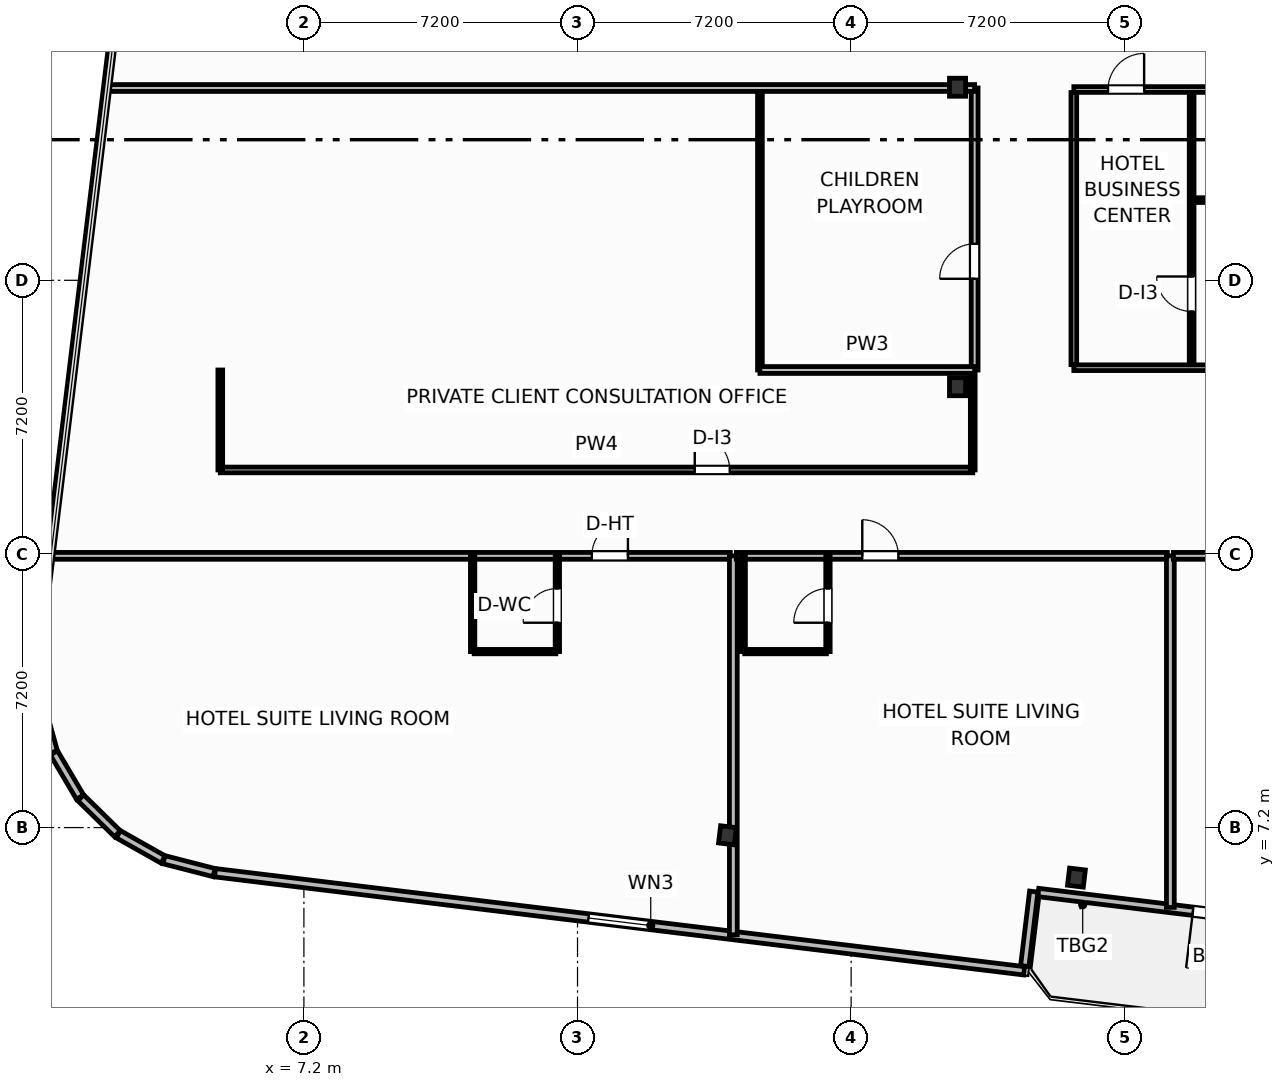
"""IFC4 building model, lengths in metres.
Left out: names, types, materials, properties, quantities, classifications, styles, units other than length and angle.
Written with IfcOpenShell. Run it as: python <this file> out.ifc"""

import sys

from ifc_helpers import new_model, si_unit, direction, frame, frame_2d, origin, origin_2d, place, context, subcontext, project, spatial, rectangle, i_section, extrude, element, fill, save


model = new_model("IFC4")
c1 = context("Model", 3, precision=1e-05, world=origin(), true_north=direction((0.0, 1.0)))
c2 = subcontext(c1, "Body", "Model", "MODEL_VIEW")
j1 = project(units=[si_unit("LENGTHUNIT", "METRE"), si_unit("PLANEANGLEUNIT", "RADIAN")], contexts=[c1])
p1 = place(None, origin())
s1 = spatial("IfcSite", under=j1, at=p1, CompositionType="ELEMENT")
p2 = place(p1, origin())
s2 = spatial("IfcBuilding", under=s1, at=p2, CompositionType="ELEMENT")
p3 = place(p2, frame((0.0, 0.0, 132.8)))
s3 = spatial("IfcBuildingStorey", under=s2, at=p3, CompositionType="ELEMENT", Elevation=132.8)
for number, where, z_axis, x_axis in (
    (1, (24.4, 18.8, 0.0), (0.0, 0.0, 1.0), (1.0, 0.0, 0.0)),
    (2, (24.4, 26.68, 0.0), (0.0, 0.0, 1.0), (1.0, 0.0, 0.0)),
):
    element("IfcColumn", number, at=place(p3, frame(where, z_axis=z_axis, x_axis=x_axis)), inside=s3, PredefinedType="COLUMN", context=c2, shape_type="SweptSolid", body=[
        extrude(i_section(OverallWidth=0.424, OverallDepth=0.474, WebThickness=0.048, FlangeThickness=0.077, FilletRadius=0.025, at=origin_2d()), origin(), (0.0, 0.0, 1.0), 3.7),
    ])
for number, where, z_axis, x_axis in (
    (3, (18.346, 6.997, 0.0), (0.0, 0.0, 1.0), (0.993, -0.12, 0.0)),
    (4, (27.529, 5.884, 0.0), (0.0, 0.0, 1.0), (0.993, -0.12, 0.0)),
):
    element("IfcColumn", number, at=place(p3, frame(where, z_axis=z_axis, x_axis=x_axis)), inside=s3, PredefinedType="COLUMN", context=c2, shape_type="SweptSolid", body=[
        extrude(i_section(OverallWidth=0.418, OverallDepth=0.455, WebThickness=0.042, FlangeThickness=0.068, FilletRadius=0.025, at=origin_2d()), origin(), (0.0, 0.0, 1.0), 3.7),
    ])
p4 = place(p3, frame((32.48, 4.77, 0.0), z_axis=(0.0, 0.0, 1.0), x_axis=(-0.992735402148, 0.120318000826, 0.0)))
e5 = element("IfcWall", 5, at=p4, inside=s3, PredefinedType="SOLIDWALL", context=c2, shape_type="SweptSolid", body=[
    extrude(rectangle(XDim=6.0, YDim=0.22, at=frame_2d((3.0, 0.0))), origin(), (0.0, 0.0, 1.0), 2.73),
])
p5 = place(p4, frame((0.4, 0.0, 0.0)))
e6 = element("IfcOpeningElement", 6, at=p5, cuts=e5, PredefinedType="OPENING", context=c2, shape_type="SweptSolid", body=[
    extrude(rectangle(XDim=1.5, YDim=2.25, at=frame_2d((0.75, 1.125))), frame((0.0, 0.12, 0.0), z_axis=(0.0, -1.0, 0.0), x_axis=(1.0, 0.0, 0.0)), (0.0, 0.0, 1.0), 0.24),
])
p6 = place(p3, frame((0.245, 10.491, 0.0), z_axis=(0.0, 0.0, 1.0), x_axis=(0.268853470153, -0.963181089716, 0.0)))
e7 = element("IfcWall", 7, at=p6, inside=s3, PredefinedType="SOLIDWALL", context=c2, shape_type="SweptSolid", body=[
    extrude(rectangle(XDim=1.353, YDim=0.22, at=frame_2d((0.677, 0.0))), origin(), (0.0, 0.0, 1.0), 2.73),
])
p7 = place(p3, frame((0.622, 9.166, 0.0), z_axis=(0.0, 0.0, 1.0), x_axis=(0.508911700393, -0.860818727261, 0.0)))
e8 = element("IfcWall", 8, at=p7, inside=s3, PredefinedType="SOLIDWALL", context=c2, shape_type="SweptSolid", body=[
    extrude(rectangle(XDim=1.353, YDim=0.22, at=frame_2d((0.676, 0.0))), origin(), (0.0, 0.0, 1.0), 2.73),
])
p8 = place(p3, frame((1.328, 7.984, 0.0), z_axis=(0.0, 0.0, 1.0), x_axis=(0.714376989847, -0.69976104234, 0.0)))
e9 = element("IfcWall", 9, at=p8, inside=s3, PredefinedType="SOLIDWALL", context=c2, shape_type="SweptSolid", body=[
    extrude(rectangle(XDim=1.353, YDim=0.22, at=frame_2d((0.677, 0.0))), origin(), (0.0, 0.0, 1.0), 2.73),
])
p9 = place(p3, frame((2.316, 7.025, 0.0), z_axis=(0.0, 0.0, 1.0), x_axis=(0.87113677592, -0.491040443996, 0.0)))
e10 = element("IfcWall", 10, at=p9, inside=s3, PredefinedType="SOLIDWALL", context=c2, shape_type="SweptSolid", body=[
    extrude(rectangle(XDim=1.353, YDim=0.22, at=frame_2d((0.677, 0.0))), origin(), (0.0, 0.0, 1.0), 2.73),
])
p10 = place(p3, frame((3.519, 6.354, 0.0), z_axis=(0.0, 0.0, 1.0), x_axis=(0.968506529347, -0.248988157573, 0.0)))
e11 = element("IfcWall", 11, at=p10, inside=s3, PredefinedType="SOLIDWALL", context=c2, shape_type="SweptSolid", body=[
    extrude(rectangle(XDim=1.361, YDim=0.22, at=frame_2d((0.681, 0.0))), origin(), (0.0, 0.0, 1.0), 2.73),
])
p11 = place(p3, frame((4.862, 6.012, 0.0), z_axis=(0.0, 0.0, 1.0), x_axis=(0.99273213367, -0.120344965739, 0.0)))
e12 = element("IfcWall", 12, at=p11, inside=s3, PredefinedType="SOLIDWALL", context=c2, shape_type="SweptSolid", body=[
    extrude(rectangle(XDim=21.447, YDim=0.22, at=frame_2d((10.724, 0.0))), origin(), (0.0, 0.0, 1.0), 2.73),
])
p12 = place(p11, frame((9.899, 0.0, 0.8)))
e13 = element("IfcOpeningElement", 13, at=p12, cuts=e12, PredefinedType="OPENING", context=c2, shape_type="SweptSolid", body=[
    extrude(rectangle(XDim=1.65, YDim=1.65, at=frame_2d((0.825, 0.825))), frame((0.0, 0.12, 0.0), z_axis=(0.0, -1.0, 0.0), x_axis=(1.0, 0.0, 0.0)), (0.0, 0.0, 1.0), 0.24),
])
p13 = place(p3, frame((26.168, 3.555, 0.0), z_axis=(0.0, 0.0, 1.0), x_axis=(0.120290754542, 0.992738703976, 0.0)))
e14 = element("IfcWall", 14, at=p13, inside=s3, PredefinedType="SOLIDWALL", context=c2, shape_type="SweptSolid", body=[
    extrude(rectangle(XDim=1.975, YDim=0.22, at=frame_2d((0.987, 0.0))), origin(), (0.0, 0.0, 1.0), 2.73),
])
p14 = place(p3, frame((5.0, 16.61, 0.0), z_axis=(0.0, 0.0, 1.0), x_axis=(1.0, 0.0, 0.0)))
e15 = element("IfcWall", 15, at=p14, inside=s3, PredefinedType="PARTITIONING", context=c2, shape_type="SweptSolid", body=[
    extrude(rectangle(XDim=19.8, YDim=0.15, at=frame_2d((9.9, 0.0))), origin(), (0.0, 0.0, 1.0), 3.45),
])
p15 = place(p14, frame((12.485, 0.0, 0.0)))
e16 = element("IfcOpeningElement", 16, at=p15, cuts=e15, PredefinedType="OPENING", context=c2, shape_type="SweptSolid", body=[
    extrude(rectangle(XDim=0.92, YDim=2.05, at=frame_2d((0.46, 1.025))), frame((0.0, 0.085, 0.0), z_axis=(0.0, -1.0, 0.0), x_axis=(1.0, 0.0, 0.0)), (0.0, 0.0, 1.0), 0.17),
])
p16 = place(p3, frame((5.0, 16.61, 0.0), z_axis=(0.0, 0.0, 1.0), x_axis=(0.0, 1.0, 0.0)))
e17 = element("IfcWall", 17, at=p16, inside=s3, PredefinedType="PARTITIONING", context=c2, shape_type="SweptSolid", body=[
    extrude(rectangle(XDim=2.63, YDim=0.125, at=frame_2d((1.315, 0.0))), origin(), (0.0, 0.0, 1.0), 3.45),
])
p17 = place(p3, frame((24.8, 16.61, 0.0), z_axis=(0.0, 0.0, 1.0), x_axis=(0.0, 1.0, 0.0)))
e18 = element("IfcWall", 18, at=p17, inside=s3, PredefinedType="PARTITIONING", context=c2, shape_type="SweptSolid", body=[
    extrude(rectangle(XDim=2.63, YDim=0.125, at=frame_2d((1.315, 0.0))), origin(), (0.0, 0.0, 1.0), 2.662),
])
p18 = place(p3, frame((0.581, 14.35, 0.0), z_axis=(0.0, 0.0, 1.0), x_axis=(1.0, 0.0, 0.0)))
e19 = element("IfcWall", 19, at=p18, inside=s3, PredefinedType="PARTITIONING", context=c2, shape_type="SweptSolid", body=[
    extrude(rectangle(XDim=17.839, YDim=0.18, at=frame_2d((8.919, 0.0))), origin(), (0.0, 0.0, 1.0), 3.45),
])
p19 = place(p18, frame((14.196, 0.0, 0.0)))
e20 = element("IfcOpeningElement", 20, at=p19, cuts=e19, PredefinedType="OPENING", context=c2, shape_type="SweptSolid", body=[
    extrude(rectangle(XDim=0.95, YDim=2.15, at=frame_2d((0.475, 1.075))), frame((0.0, 0.1, 0.0), z_axis=(0.0, -1.0, 0.0), x_axis=(1.0, 0.0, 0.0)), (0.0, 0.0, 1.0), 0.2),
])
p20 = place(p3, frame((11.68, 11.83, 0.0), z_axis=(0.0, 0.0, 1.0), x_axis=(1.0, 0.0, 0.0)))
e21 = element("IfcWall", 21, at=p20, inside=s3, PredefinedType="PARTITIONING", context=c2, shape_type="SweptSolid", body=[
    extrude(rectangle(XDim=2.15, YDim=0.115, at=frame_2d((1.075, 0.0))), origin(), (0.0, 0.0, 1.0), 3.45),
])
p21 = place(p3, frame((13.87, 11.83, 0.0), z_axis=(0.0, 0.0, 1.0), x_axis=(0.0, 1.0, 0.0)))
e22 = element("IfcWall", 22, at=p21, inside=s3, PredefinedType="PARTITIONING", context=c2, shape_type="SweptSolid", body=[
    extrude(rectangle(XDim=2.52, YDim=0.115, at=frame_2d((1.26, 0.0))), origin(), (0.0, 0.0, 1.0), 3.45),
])
p22 = place(p21, frame((0.76, 0.0, 0.0)))
e23 = element("IfcOpeningElement", 23, at=p22, cuts=e22, PredefinedType="OPENING", context=c2, shape_type="SweptSolid", body=[
    extrude(rectangle(XDim=0.9, YDim=2.05, at=frame_2d((0.45, 1.025))), frame((0.0, 0.067, 0.0), z_axis=(0.0, -1.0, 0.0), x_axis=(1.0, 0.0, 0.0)), (0.0, 0.0, 1.0), 0.135),
])
p23 = place(p3, frame((11.64, 11.83, 0.0), z_axis=(0.0, 0.0, 1.0), x_axis=(0.0, 1.0, 0.0)))
e24 = element("IfcWall", 24, at=p23, inside=s3, PredefinedType="PARTITIONING", context=c2, shape_type="SweptSolid", body=[
    extrude(rectangle(XDim=2.52, YDim=0.115, at=frame_2d((1.26, 0.0))), origin(), (0.0, 0.0, 1.0), 3.45),
])
p24 = place(p3, frame((18.5, 4.379, 0.0), z_axis=(0.0, 0.0, 1.0), x_axis=(0.0, 1.0, 0.0)))
e25 = element("IfcWall", 25, at=p24, inside=s3, PredefinedType="PARTITIONING", context=c2, shape_type="SweptSolid", body=[
    extrude(rectangle(XDim=9.971, YDim=0.205, at=frame_2d((4.985, 0.0))), origin(), (0.0, 0.0, 1.0), 3.45),
])
p25 = place(p3, frame((18.58, 14.35, 0.0), z_axis=(0.0, 0.0, 1.0), x_axis=(1.0, 0.0, 0.0)))
e26 = element("IfcWall", 26, at=p25, inside=s3, PredefinedType="PARTITIONING", context=c2, shape_type="SweptSolid", body=[
    extrude(rectangle(XDim=11.34, YDim=0.18, at=frame_2d((5.67, 0.0))), origin(), (0.0, 0.0, 1.0), 3.45),
])
p26 = place(p25, frame((3.313, 0.0, 0.0)))
e27 = element("IfcOpeningElement", 27, at=p26, cuts=e26, PredefinedType="OPENING", context=c2, shape_type="SweptSolid", body=[
    extrude(rectangle(XDim=0.95, YDim=2.15, at=frame_2d((0.475, 1.075))), frame((0.0, 0.1, 0.0), z_axis=(0.0, -1.0, 0.0), x_axis=(1.0, 0.0, 0.0)), (0.0, 0.0, 1.0), 0.2),
])
p27 = place(p3, frame((18.8, 11.83, 0.0), z_axis=(0.0, 0.0, 1.0), x_axis=(1.0, 0.0, 0.0)))
e28 = element("IfcWall", 28, at=p27, inside=s3, PredefinedType="PARTITIONING", context=c2, shape_type="SweptSolid", body=[
    extrude(rectangle(XDim=2.15, YDim=0.115, at=frame_2d((1.075, 0.0))), origin(), (0.0, 0.0, 1.0), 3.45),
])
p28 = place(p3, frame((20.99, 11.83, 0.0), z_axis=(0.0, 0.0, 1.0), x_axis=(0.0, 1.0, 0.0)))
e29 = element("IfcWall", 29, at=p28, inside=s3, PredefinedType="PARTITIONING", context=c2, shape_type="SweptSolid", body=[
    extrude(rectangle(XDim=2.52, YDim=0.115, at=frame_2d((1.26, 0.0))), origin(), (0.0, 0.0, 1.0), 3.45),
])
p29 = place(p28, frame((0.76, 0.0, 0.0)))
e30 = element("IfcOpeningElement", 30, at=p29, cuts=e29, PredefinedType="OPENING", context=c2, shape_type="SweptSolid", body=[
    extrude(rectangle(XDim=0.9, YDim=2.05, at=frame_2d((0.45, 1.025))), frame((0.0, 0.067, 0.0), z_axis=(0.0, -1.0, 0.0), x_axis=(1.0, 0.0, 0.0)), (0.0, 0.0, 1.0), 0.135),
])
p30 = place(p3, frame((18.76, 11.83, 0.0), z_axis=(0.0, 0.0, 1.0), x_axis=(0.0, 1.0, 0.0)))
e31 = element("IfcWall", 31, at=p30, inside=s3, PredefinedType="PARTITIONING", context=c2, shape_type="SweptSolid", body=[
    extrude(rectangle(XDim=2.52, YDim=0.115, at=frame_2d((1.26, 0.0))), origin(), (0.0, 0.0, 1.0), 3.45),
])
p31 = place(p3, frame((30.0, 5.1, 0.0), z_axis=(0.0, 0.0, 1.0), x_axis=(0.0, 1.0, 0.0)))
e32 = element("IfcWall", 32, at=p31, inside=s3, PredefinedType="PARTITIONING", context=c2, shape_type="SweptSolid", body=[
    extrude(rectangle(XDim=9.25, YDim=0.205, at=frame_2d((4.625, 0.0))), origin(), (0.0, 0.0, 1.0), 3.45),
])
p32 = place(p3, frame((30.08, 14.35, 0.0), z_axis=(0.0, 0.0, 1.0), x_axis=(1.0, 0.0, 0.0)))
e33 = element("IfcWall", 33, at=p32, inside=s3, PredefinedType="PARTITIONING", context=c2, shape_type="SweptSolid", body=[
    extrude(rectangle(XDim=11.34, YDim=0.18, at=frame_2d((5.67, 0.0))), origin(), (0.0, 0.0, 1.0), 3.45),
])
p33 = place(p32, frame((0.923, 0.0, 0.0)))
e34 = element("IfcOpeningElement", 34, at=p33, cuts=e33, PredefinedType="OPENING", context=c2, shape_type="SweptSolid", body=[
    extrude(rectangle(XDim=0.95, YDim=2.15, at=frame_2d((0.475, 1.075))), frame((0.0, 0.1, 0.0), z_axis=(0.0, -1.0, 0.0), x_axis=(1.0, 0.0, 0.0)), (0.0, 0.0, 1.0), 0.2),
])
p34 = place(p3, frame((24.85, 19.24, 0.0), z_axis=(0.0, 0.0, 1.0), x_axis=(0.0, 1.0, 0.0)))
e35 = element("IfcWall", 35, at=p34, inside=s3, PredefinedType="PARTITIONING", context=c2, shape_type="SweptSolid", body=[
    extrude(rectangle(XDim=7.42, YDim=0.18, at=frame_2d((3.71, 0.0))), origin(), (0.0, 0.0, 1.0), 3.45),
])
p35 = place(p34, frame((2.4, 0.0, 0.0)))
e36 = element("IfcOpeningElement", 36, at=p35, cuts=e35, PredefinedType="OPENING", context=c2, shape_type="SweptSolid", body=[
    extrude(rectangle(XDim=0.92, YDim=2.05, at=frame_2d((0.46, 1.025))), frame((0.0, 0.1, 0.0), z_axis=(0.0, -1.0, 0.0), x_axis=(1.0, 0.0, 0.0)), (0.0, 0.0, 1.0), 0.2),
])
p36 = place(p3, frame((19.2, 19.24, 0.0), z_axis=(0.0, 0.0, 1.0), x_axis=(0.0, 1.0, 0.0)))
e37 = element("IfcWall", 37, at=p36, inside=s3, PredefinedType="PARTITIONING", context=c2, shape_type="SweptSolid", body=[
    extrude(rectangle(XDim=7.42, YDim=0.125, at=frame_2d((3.71, 0.0))), origin(), (0.0, 0.0, 1.0), 3.45),
])
p37 = place(p3, frame((19.2, 19.24, 0.0), z_axis=(0.0, 0.0, 1.0), x_axis=(1.0, 0.0, 0.0)))
e38 = element("IfcWall", 38, at=p37, inside=s3, PredefinedType="PARTITIONING", context=c2, shape_type="SweptSolid", body=[
    extrude(rectangle(XDim=5.65, YDim=0.18, at=frame_2d((2.825, 0.0))), origin(), (0.0, 0.0, 1.0), 3.45),
])
p38 = place(p3, frame((2.073, 26.66, 0.0), z_axis=(0.0, 0.0, 1.0), x_axis=(1.0, 0.0, 0.0)))
e39 = element("IfcWall", 39, at=p38, inside=s3, PredefinedType="PARTITIONING", context=c2, shape_type="SweptSolid", body=[
    extrude(rectangle(XDim=22.777, YDim=0.18, at=frame_2d((11.388, 0.0))), origin(), (0.0, 0.0, 1.0), 2.662),
])
p39 = place(p3, frame((27.46, 26.62, 0.0), z_axis=(0.0, 0.0, 1.0), x_axis=(1.0, 0.0, 0.0)))
e40 = element("IfcWall", 40, at=p39, inside=s3, PredefinedType="PARTITIONING", context=c2, shape_type="SweptSolid", body=[
    extrude(rectangle(XDim=6.1, YDim=0.15, at=frame_2d((3.05, 0.0))), origin(), (0.0, 0.0, 1.0), 2.662),
])
p40 = place(p39, frame((0.9, 0.0, 0.0)))
e41 = element("IfcOpeningElement", 41, at=p40, cuts=e40, PredefinedType="OPENING", context=c2, shape_type="SweptSolid", body=[
    extrude(rectangle(XDim=0.95, YDim=2.05, at=frame_2d((0.475, 1.025))), frame((0.0, 0.085, 0.0), z_axis=(0.0, -1.0, 0.0), x_axis=(1.0, 0.0, 0.0)), (0.0, 0.0, 1.0), 0.17),
])
p41 = place(p39, frame((4.303, 0.0, 0.0)))
e42 = element("IfcOpeningElement", 42, at=p41, cuts=e40, PredefinedType="OPENING", context=c2, shape_type="SweptSolid", body=[
    extrude(rectangle(XDim=0.9, YDim=2.05, at=frame_2d((0.45, 1.025))), frame((0.0, 0.085, 0.0), z_axis=(0.0, -1.0, 0.0), x_axis=(1.0, 0.0, 0.0)), (0.0, 0.0, 1.0), 0.17),
])
p42 = place(p3, frame((27.46, 19.3, 0.0), z_axis=(0.0, 0.0, 1.0), x_axis=(1.0, 0.0, 0.0)))
e43 = element("IfcWall", 43, at=p42, inside=s3, PredefinedType="PARTITIONING", context=c2, shape_type="SweptSolid", body=[
    extrude(rectangle(XDim=6.1, YDim=0.15, at=frame_2d((3.05, 0.0))), origin(), (0.0, 0.0, 1.0), 2.662),
])
p43 = place(p3, frame((30.56, 19.38, 0.0), z_axis=(0.0, 0.0, 1.0), x_axis=(0.0, 1.0, 0.0)))
e44 = element("IfcWall", 44, at=p43, inside=s3, PredefinedType="PARTITIONING", context=c2, shape_type="SweptSolid", body=[
    extrude(rectangle(XDim=7.16, YDim=0.125, at=frame_2d((3.58, 0.0))), origin(), (0.0, 0.0, 1.0), 3.45),
])
p44 = place(p43, frame((1.4, 0.0, 0.0)))
e45 = element("IfcOpeningElement", 45, at=p44, cuts=e44, PredefinedType="OPENING", context=c2, shape_type="SweptSolid", body=[
    extrude(rectangle(XDim=0.92, YDim=2.05, at=frame_2d((0.46, 1.025))), frame((0.0, 0.073, 0.0), z_axis=(0.0, -1.0, 0.0), x_axis=(1.0, 0.0, 0.0)), (0.0, 0.0, 1.0), 0.145),
])
p45 = place(p3, frame((30.64, 23.71, 0.0), z_axis=(0.0, 0.0, 1.0), x_axis=(1.0, 0.0, 0.0)))
e46 = element("IfcWall", 46, at=p45, inside=s3, PredefinedType="PARTITIONING", context=c2, shape_type="SweptSolid", body=[
    extrude(rectangle(XDim=2.88, YDim=0.125, at=frame_2d((1.44, 0.0))), origin(), (0.0, 0.0, 1.0), 3.45),
])
p46 = place(p3, frame((27.46, 19.38, 0.0), z_axis=(0.0, 0.0, 1.0), x_axis=(0.0, 1.0, 0.0)))
e47 = element("IfcWall", 47, at=p46, inside=s3, PredefinedType="PARTITIONING", context=c2, shape_type="SweptSolid", body=[
    extrude(rectangle(XDim=7.16, YDim=0.15, at=frame_2d((3.58, 0.0))), origin(), (0.0, 0.0, 1.0), 3.45),
])
p47 = place(p5, origin())
e48 = element("IfcDoor", 48, at=p47, inside=s3, OperationType="SINGLE_SWING_RIGHT", PredefinedType="DOOR", context=c2, shape_type="SweptSolid", body=[
    extrude(rectangle(XDim=1.5, YDim=2.25, at=frame_2d((0.75, 1.125))), frame((0.0, 0.025, 0.0), z_axis=(0.0, -1.0, 0.0), x_axis=(1.0, 0.0, 0.0)), (0.0, 0.0, 1.0), 0.05),
])
fill(e6, e48)
p48 = place(p12, origin())
e49 = element("IfcWindow", 49, at=p48, inside=s3, PartitioningType="SINGLE_PANEL", PredefinedType="WINDOW", context=c2, shape_type="SweptSolid", body=[
    extrude(rectangle(XDim=1.65, YDim=1.65, at=frame_2d((0.825, 0.825))), frame((0.0, 0.03, 0.0), z_axis=(0.0, -1.0, 0.0), x_axis=(1.0, 0.0, 0.0)), (0.0, 0.0, 1.0), 0.06),
])
fill(e13, e49)
p49 = place(p15, origin())
e50 = element("IfcDoor", 50, at=p49, inside=s3, OperationType="SINGLE_SWING_LEFT", PredefinedType="DOOR", context=c2, shape_type="SweptSolid", body=[
    extrude(rectangle(XDim=0.92, YDim=2.05, at=frame_2d((0.46, 1.025))), frame((0.0, 0.025, 0.0), z_axis=(0.0, -1.0, 0.0), x_axis=(1.0, 0.0, 0.0)), (0.0, 0.0, 1.0), 0.05),
])
fill(e16, e50)
p50 = place(p19, origin())
e51 = element("IfcDoor", 51, at=p50, inside=s3, OperationType="SINGLE_SWING_RIGHT", PredefinedType="DOOR", context=c2, shape_type="SweptSolid", body=[
    extrude(rectangle(XDim=0.95, YDim=2.15, at=frame_2d((0.475, 1.075))), frame((0.0, 0.025, 0.0), z_axis=(0.0, -1.0, 0.0), x_axis=(1.0, 0.0, 0.0)), (0.0, 0.0, 1.0), 0.05),
])
fill(e20, e51)
p51 = place(p22, origin())
e52 = element("IfcDoor", 52, at=p51, inside=s3, OperationType="SINGLE_SWING_LEFT", PredefinedType="DOOR", context=c2, shape_type="SweptSolid", body=[
    extrude(rectangle(XDim=0.9, YDim=2.05, at=frame_2d((0.45, 1.025))), frame((0.0, 0.025, 0.0), z_axis=(0.0, -1.0, 0.0), x_axis=(1.0, 0.0, 0.0)), (0.0, 0.0, 1.0), 0.05),
])
fill(e23, e52)
p52 = place(p26, origin())
e53 = element("IfcDoor", 53, at=p52, inside=s3, OperationType="SINGLE_SWING_LEFT", PredefinedType="DOOR", context=c2, shape_type="SweptSolid", body=[
    extrude(rectangle(XDim=0.95, YDim=2.15, at=frame_2d((0.475, 1.075))), frame((0.0, 0.025, 0.0), z_axis=(0.0, -1.0, 0.0), x_axis=(1.0, 0.0, 0.0)), (0.0, 0.0, 1.0), 0.05),
])
fill(e27, e53)
p53 = place(p29, origin())
e54 = element("IfcDoor", 54, at=p53, inside=s3, OperationType="SINGLE_SWING_LEFT", PredefinedType="DOOR", context=c2, shape_type="SweptSolid", body=[
    extrude(rectangle(XDim=0.9, YDim=2.05, at=frame_2d((0.45, 1.025))), frame((0.0, 0.025, 0.0), z_axis=(0.0, -1.0, 0.0), x_axis=(1.0, 0.0, 0.0)), (0.0, 0.0, 1.0), 0.05),
])
fill(e30, e54)
p54 = place(p35, origin())
e55 = element("IfcDoor", 55, at=p54, inside=s3, OperationType="SINGLE_SWING_LEFT", PredefinedType="DOOR", context=c2, shape_type="SweptSolid", body=[
    extrude(rectangle(XDim=0.92, YDim=2.05, at=frame_2d((0.46, 1.025))), frame((0.0, 0.025, 0.0), z_axis=(0.0, -1.0, 0.0), x_axis=(1.0, 0.0, 0.0)), (0.0, 0.0, 1.0), 0.05),
])
fill(e36, e55)
p55 = place(p40, origin())
e56 = element("IfcDoor", 56, at=p55, inside=s3, OperationType="SINGLE_SWING_RIGHT", PredefinedType="DOOR", context=c2, shape_type="SweptSolid", body=[
    extrude(rectangle(XDim=0.95, YDim=2.05, at=frame_2d((0.475, 1.025))), frame((0.0, 0.025, 0.0), z_axis=(0.0, -1.0, 0.0), x_axis=(1.0, 0.0, 0.0)), (0.0, 0.0, 1.0), 0.05),
])
fill(e41, e56)
p56 = place(p44, origin())
e57 = element("IfcDoor", 57, at=p56, inside=s3, OperationType="SINGLE_SWING_RIGHT", PredefinedType="DOOR", context=c2, shape_type="SweptSolid", body=[
    extrude(rectangle(XDim=0.92, YDim=2.05, at=frame_2d((0.46, 1.025))), frame((0.0, 0.025, 0.0), z_axis=(0.0, -1.0, 0.0), x_axis=(1.0, 0.0, 0.0)), (0.0, 0.0, 1.0), 0.05),
])
fill(e45, e57)
save(model, sys.argv[1])
